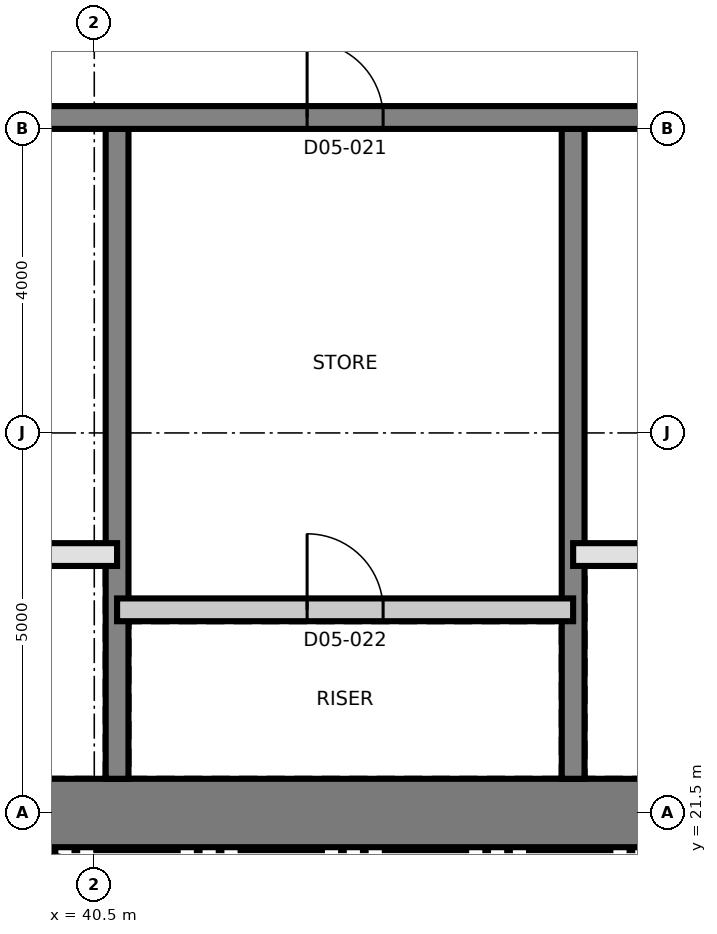
"""IFC4 building model, lengths in metres.
Left out: names, types, materials, properties, quantities, classifications, styles, units other than length and angle.
Written with IfcOpenShell. Run it as: python <this file> out.ifc"""

import sys

from ifc_helpers import new_model, si_unit, direction, frame, frame_2d, origin, place, context, subcontext, project, spatial, rectangle, extrude, element, fill, save


model = new_model("IFC4")
c1 = context("Model", 3, precision=1e-05, world=origin(), true_north=direction((0.0, 1.0)))
c2 = subcontext(c1, "Body", "Model", "MODEL_VIEW")
j1 = project(units=[si_unit("LENGTHUNIT", "METRE"), si_unit("PLANEANGLEUNIT", "RADIAN")], contexts=[c1])
p1 = place(None, origin())
s1 = spatial("IfcSite", under=j1, at=p1, CompositionType="ELEMENT")
p2 = place(p1, origin())
s2 = spatial("IfcBuilding", under=s1, at=p2, CompositionType="ELEMENT")
p3 = place(p2, frame((0.0, 0.0, 74.2)))
s3 = spatial("IfcBuildingStorey", under=s2, at=p3, CompositionType="ELEMENT", Elevation=74.2)
p4 = place(p3, frame((31.05, 21.5, 0.0), z_axis=(0.0, 0.0, 1.0), x_axis=(1.0, 0.0, 0.0)))
e1 = element("IfcWall", 1, at=p4, inside=s3, PredefinedType="SHEAR", context=c2, shape_type="SweptSolid", body=[
    extrude(rectangle(XDim=27.0, YDim=0.9, at=frame_2d((13.5, 0.0))), origin(), (0.0, 0.0, 1.0), 3.7),
])
for number, where, z_axis, x_axis in (
    (2, (40.8, 21.95, 0.0), (0.0, 0.0, 1.0), (0.0, 1.0, 0.0)),
    (3, (46.8, 21.95, 0.0), (0.0, 0.0, 1.0), (0.0, 1.0, 0.0)),
):
    element("IfcWall", number, at=place(p3, frame(where, z_axis=z_axis, x_axis=x_axis)), inside=s3, PredefinedType="SHEAR", context=c2, shape_type="SweptSolid", body=[
        extrude(rectangle(XDim=8.55, YDim=0.3, at=frame_2d((4.275, 0.0))), origin(), (0.0, 0.0, 1.0), 3.7),
    ])
p5 = place(p3, frame((31.95, 30.65, 0.0), z_axis=(0.0, 0.0, 1.0), x_axis=(1.0, 0.0, 0.0)))
e4 = element("IfcWall", 4, at=p5, inside=s3, PredefinedType="SHEAR", context=c2, shape_type="SweptSolid", body=[
    extrude(rectangle(XDim=26.1, YDim=0.3, at=frame_2d((13.05, 0.0))), origin(), (0.0, 0.0, 1.0), 3.7),
])
p6 = place(p5, frame((24.55, 0.0, 0.0)))
e5 = element("IfcOpeningElement", 5, at=p6, cuts=e4, PredefinedType="OPENING", context=c2, shape_type="SweptSolid", body=[
    extrude(rectangle(XDim=1.0, YDim=2.1, at=frame_2d((0.5, 1.05))), frame((0.0, 0.16, 0.0), z_axis=(0.0, -1.0, 0.0), x_axis=(1.0, 0.0, 0.0)), (0.0, 0.0, 1.0), 0.32),
])
p7 = place(p5, frame((11.35, 0.0, 0.0)))
e6 = element("IfcOpeningElement", 6, at=p7, cuts=e4, PredefinedType="OPENING", context=c2, shape_type="SweptSolid", body=[
    extrude(rectangle(XDim=1.0, YDim=2.1, at=frame_2d((0.5, 1.05))), frame((0.0, 0.16, 0.0), z_axis=(0.0, -1.0, 0.0), x_axis=(1.0, 0.0, 0.0)), (0.0, 0.0, 1.0), 0.32),
])
p8 = place(p3, frame((39.735, 20.846, 0.0), z_axis=(0.0, 0.0, 1.0), x_axis=(0.97206095595, -0.234728562212, 0.0)))
e7 = element("IfcWall", 7, at=p8, inside=s3, PredefinedType="SOLIDWALL", context=c2, shape_type="SweptSolid", body=[
    extrude(rectangle(XDim=2.35, YDim=0.3, at=frame_2d((1.175, 0.0))), origin(), (0.0, 0.0, 1.0), 3.4),
])
p9 = place(p3, frame((40.8, 24.173, 0.0), z_axis=(0.0, 0.0, 1.0), x_axis=(1.0, 0.0, 0.0)))
e8 = element("IfcWall", 8, at=p9, inside=s3, PredefinedType="PARTITIONING", context=c2, shape_type="SweptSolid", body=[
    extrude(rectangle(XDim=6.0, YDim=0.3, at=frame_2d((3.0, 0.0))), origin(), (0.0, 0.0, 1.0), 3.4),
])
p10 = place(p9, frame((2.5, 0.0, 0.0)))
e9 = element("IfcOpeningElement", 9, at=p10, cuts=e8, PredefinedType="OPENING", context=c2, shape_type="SweptSolid", body=[
    extrude(rectangle(XDim=1.0, YDim=2.1, at=frame_2d((0.5, 1.05))), frame((0.0, 0.16, 0.0), z_axis=(0.0, -1.0, 0.0), x_axis=(1.0, 0.0, 0.0)), (0.0, 0.0, 1.0), 0.32),
])
p11 = place(p3, frame((31.8, 24.9, 0.0), z_axis=(0.0, 0.0, 1.0), x_axis=(1.0, 0.0, 0.0)))
e10 = element("IfcWall", 10, at=p11, inside=s3, PredefinedType="SOLIDWALL", context=c2, shape_type="SweptSolid", body=[
    extrude(rectangle(XDim=9.0, YDim=0.3, at=frame_2d((4.5, 0.0))), origin(), (0.0, 0.0, 1.0), 3.4),
])
p12 = place(p11, frame((7.05, 0.0, 0.0)))
e11 = element("IfcOpeningElement", 11, at=p12, cuts=e10, PredefinedType="OPENING", context=c2, shape_type="SweptSolid", body=[
    extrude(rectangle(XDim=0.9, YDim=2.1, at=frame_2d((0.45, 1.05))), frame((0.0, 0.16, 0.0), z_axis=(0.0, -1.0, 0.0), x_axis=(1.0, 0.0, 0.0)), (0.0, 0.0, 1.0), 0.32),
])
p13 = place(p11, frame((0.95, 0.0, 0.0)))
e12 = element("IfcOpeningElement", 12, at=p13, cuts=e10, PredefinedType="OPENING", context=c2, shape_type="SweptSolid", body=[
    extrude(rectangle(XDim=1.1, YDim=2.4, at=frame_2d((0.55, 1.2))), frame((0.0, 0.16, 0.0), z_axis=(0.0, -1.0, 0.0), x_axis=(1.0, 0.0, 0.0)), (0.0, 0.0, 1.0), 0.32),
])
p14 = place(p11, frame((3.95, 0.0, 0.0)))
e13 = element("IfcOpeningElement", 13, at=p14, cuts=e10, PredefinedType="OPENING", context=c2, shape_type="SweptSolid", body=[
    extrude(rectangle(XDim=1.1, YDim=2.4, at=frame_2d((0.55, 1.2))), frame((0.0, 0.16, 0.0), z_axis=(0.0, -1.0, 0.0), x_axis=(1.0, 0.0, 0.0)), (0.0, 0.0, 1.0), 0.32),
])
p15 = place(p3, frame((46.8, 24.9, 0.0), z_axis=(0.0, 0.0, 1.0), x_axis=(1.0, 0.0, 0.0)))
e14 = element("IfcWall", 14, at=p15, inside=s3, PredefinedType="SOLIDWALL", context=c2, shape_type="SweptSolid", body=[
    extrude(rectangle(XDim=9.0, YDim=0.3, at=frame_2d((4.5, 0.0))), origin(), (0.0, 0.0, 1.0), 3.4),
])
p16 = place(p15, frame((1.05, 0.0, 0.0)))
e15 = element("IfcOpeningElement", 15, at=p16, cuts=e14, PredefinedType="OPENING", context=c2, shape_type="SweptSolid", body=[
    extrude(rectangle(XDim=0.9, YDim=2.1, at=frame_2d((0.45, 1.05))), frame((0.0, 0.16, 0.0), z_axis=(0.0, -1.0, 0.0), x_axis=(1.0, 0.0, 0.0)), (0.0, 0.0, 1.0), 0.32),
])
p17 = place(p7, origin())
e16 = element("IfcDoor", 16, at=p17, inside=s3, OperationType="SINGLE_SWING_LEFT", PredefinedType="DOOR", context=c2, shape_type="SweptSolid", body=[
    extrude(rectangle(XDim=1.0, YDim=2.1, at=frame_2d((0.5, 1.05))), frame((0.0, 0.025, 0.0), z_axis=(0.0, -1.0, 0.0), x_axis=(1.0, 0.0, 0.0)), (0.0, 0.0, 1.0), 0.05),
])
fill(e6, e16)
p18 = place(p10, origin())
e17 = element("IfcDoor", 17, at=p18, inside=s3, OperationType="SINGLE_SWING_RIGHT", PredefinedType="DOOR", context=c2, shape_type="SweptSolid", body=[
    extrude(rectangle(XDim=1.0, YDim=2.1, at=frame_2d((0.5, 1.05))), frame((0.0, 0.025, 0.0), z_axis=(0.0, -1.0, 0.0), x_axis=(1.0, 0.0, 0.0)), (0.0, 0.0, 1.0), 0.05),
])
fill(e9, e17)
save(model, sys.argv[1])
